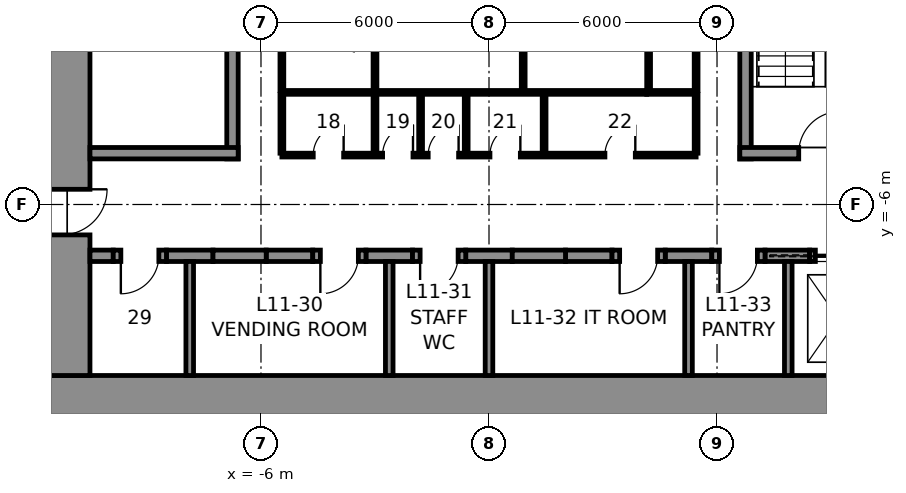
"""IFC4 building model, lengths in metres.
Left out: names, types, materials, properties, quantities, classifications, styles, units other than length and angle.
Written with IfcOpenShell. Run it as: python <this file> out.ifc"""

import sys

from ifc_helpers import new_model, si_unit, direction, frame, frame_2d, origin, place, context, subcontext, project, spatial, rectangle, extrude, element, fill, save


model = new_model("IFC4")
c1 = context("Model", 3, precision=1e-05, world=origin(), true_north=direction((0.0, 1.0)))
c2 = subcontext(c1, "Body", "Model", "MODEL_VIEW")
j1 = project(units=[si_unit("LENGTHUNIT", "METRE"), si_unit("PLANEANGLEUNIT", "RADIAN")], contexts=[c1])
p1 = place(None, origin())
s1 = spatial("IfcSite", under=j1, at=p1, CompositionType="ELEMENT")
p2 = place(p1, origin())
s2 = spatial("IfcBuilding", under=s1, at=p2, CompositionType="ELEMENT")
p3 = place(p2, frame((0.0, 0.0, 59.5)))
s3 = spatial("IfcBuildingStorey", under=s2, at=p3, CompositionType="ELEMENT", Elevation=59.5)
p4 = place(p3, frame((12.0, -11.25, 0.0), z_axis=(0.0, 0.0, 1.0), x_axis=(-1.0, 0.0, 0.0)))
e1 = element("IfcWall", 1, at=p4, inside=s3, PredefinedType="SHEAR", context=c2, shape_type="SweptSolid", body=[
    extrude(rectangle(XDim=24.0, YDim=1.5, at=frame_2d((12.0, 0.0))), origin(), (0.0, 0.0, 1.0), 5.5),
])
p5 = place(p3, frame((-11.25, -10.5, 0.0), z_axis=(0.0, 0.0, 1.0), x_axis=(0.0, 1.0, 0.0)))
e2 = element("IfcWall", 2, at=p5, inside=s3, PredefinedType="SHEAR", context=c2, shape_type="SweptSolid", body=[
    extrude(rectangle(XDim=21.0, YDim=1.5, at=frame_2d((10.5, 0.0))), origin(), (0.0, 0.0, 1.0), 5.5),
])
p6 = place(p5, frame((16.1, 0.0, 0.0)))
e3 = element("IfcOpeningElement", 3, at=p6, cuts=e2, PredefinedType="OPENING", context=c2, shape_type="SweptSolid", body=[
    extrude(rectangle(XDim=1.2, YDim=2.3, at=frame_2d((0.6, 1.15))), frame((0.0, 0.76, 0.0), z_axis=(0.0, -1.0, 0.0), x_axis=(1.0, 0.0, 0.0)), (0.0, 0.0, 1.0), 1.52),
])
p7 = place(p5, frame((3.7, 0.0, 0.0)))
e4 = element("IfcOpeningElement", 4, at=p7, cuts=e2, PredefinedType="OPENING", context=c2, shape_type="SweptSolid", body=[
    extrude(rectangle(XDim=1.2, YDim=2.3, at=frame_2d((0.6, 1.15))), frame((0.0, 0.76, 0.0), z_axis=(0.0, -1.0, 0.0), x_axis=(1.0, 0.0, 0.0)), (0.0, 0.0, 1.0), 1.52),
])
p8 = place(p3, frame((-10.5, -7.35, 0.0), z_axis=(0.0, 0.0, 1.0), x_axis=(1.0, 0.0, 0.0)))
e5 = element("IfcWall", 5, at=p8, inside=s3, PredefinedType="SHEAR", context=c2, shape_type="SweptSolid", body=[
    extrude(rectangle(XDim=0.613, YDim=0.3, at=frame_2d((0.306, 0.0))), origin(), (0.0, 0.0, 1.0), 5.5),
])
for number, where, z_axis, x_axis in (
    (6, (-8.488, -7.35, 0.0), (0.0, 0.0, 1.0), (1.0, 0.0, 0.0)),
    (7, (-5.863, -7.35, 0.0), (0.0, 0.0, 1.0), (1.0, 0.0, 0.0)),
    (8, (-3.238, -7.35, 0.0), (0.0, 0.0, 1.0), (1.0, 0.0, 0.0)),
    (9, (-0.613, -7.35, 0.0), (0.0, 0.0, 1.0), (1.0, 0.0, 0.0)),
    (10, (2.012, -7.35, 0.0), (0.0, 0.0, 1.0), (1.0, 0.0, 0.0)),
    (11, (4.637, -7.35, 0.0), (0.0, 0.0, 1.0), (1.0, 0.0, 0.0)),
):
    element("IfcWall", number, at=place(p3, frame(where, z_axis=z_axis, x_axis=x_axis)), inside=s3, PredefinedType="SHEAR", context=c2, shape_type="SweptSolid", body=[
        extrude(rectangle(XDim=1.225, YDim=0.3, at=frame_2d((0.613, 0.0))), origin(), (0.0, 0.0, 1.0), 5.5),
    ])
p9 = place(p3, frame((7.262, -7.35, 0.0), z_axis=(0.0, 0.0, 1.0), x_axis=(1.0, 0.0, 0.0)))
e12 = element("IfcWall", 12, at=p9, inside=s3, PredefinedType="SHEAR", context=c2, shape_type="SweptSolid", body=[
    extrude(rectangle(XDim=1.175, YDim=0.3, at=frame_2d((0.587, 0.0))), origin(), (0.0, 0.0, 1.0), 5.5),
])
p10 = place(p3, frame((-9.887, -7.35, 0.0), z_axis=(0.0, 0.0, 1.0), x_axis=(1.0, 0.0, 0.0)))
e13 = element("IfcWall", 13, at=p10, inside=s3, PredefinedType="PARTITIONING", context=c2, shape_type="SweptSolid", body=[
    extrude(rectangle(XDim=1.4, YDim=0.3, at=frame_2d((0.7, 0.0))), origin(), (0.0, 0.0, 1.0), 5.5),
])
p11 = place(p10, frame((0.2, 0.0, 0.0)))
e14 = element("IfcOpeningElement", 14, at=p11, cuts=e13, PredefinedType="OPENING", context=c2, shape_type="SweptSolid", body=[
    extrude(rectangle(XDim=1.0, YDim=2.3, at=frame_2d((0.5, 1.15))), frame((0.0, 0.16, 0.0), z_axis=(0.0, -1.0, 0.0), x_axis=(1.0, 0.0, 0.0)), (0.0, 0.0, 1.0), 0.32),
])
p12 = place(p3, frame((-7.262, -7.35, 0.0), z_axis=(0.0, 0.0, 1.0), x_axis=(1.0, 0.0, 0.0)))
e15 = element("IfcWall", 15, at=p12, inside=s3, PredefinedType="PARTITIONING", context=c2, shape_type="SweptSolid", body=[
    extrude(rectangle(XDim=1.4, YDim=0.3, at=frame_2d((0.7, 0.0))), origin(), (0.0, 0.0, 1.0), 5.5),
])
p13 = place(p3, frame((-4.637, -7.35, 0.0), z_axis=(0.0, 0.0, 1.0), x_axis=(1.0, 0.0, 0.0)))
e16 = element("IfcWall", 16, at=p13, inside=s3, PredefinedType="PARTITIONING", context=c2, shape_type="SweptSolid", body=[
    extrude(rectangle(XDim=1.4, YDim=0.3, at=frame_2d((0.7, 0.0))), origin(), (0.0, 0.0, 1.0), 5.5),
])
p14 = place(p13, frame((0.2, 0.0, 0.0)))
e17 = element("IfcOpeningElement", 17, at=p14, cuts=e16, PredefinedType="OPENING", context=c2, shape_type="SweptSolid", body=[
    extrude(rectangle(XDim=1.0, YDim=2.3, at=frame_2d((0.5, 1.15))), frame((0.0, 0.16, 0.0), z_axis=(0.0, -1.0, 0.0), x_axis=(1.0, 0.0, 0.0)), (0.0, 0.0, 1.0), 0.32),
])
p15 = place(p3, frame((-2.012, -7.35, 0.0), z_axis=(0.0, 0.0, 1.0), x_axis=(1.0, 0.0, 0.0)))
e18 = element("IfcWall", 18, at=p15, inside=s3, PredefinedType="PARTITIONING", context=c2, shape_type="SweptSolid", body=[
    extrude(rectangle(XDim=1.4, YDim=0.3, at=frame_2d((0.7, 0.0))), origin(), (0.0, 0.0, 1.0), 5.5),
])
p16 = place(p15, frame((0.2, 0.0, 0.0)))
e19 = element("IfcOpeningElement", 19, at=p16, cuts=e18, PredefinedType="OPENING", context=c2, shape_type="SweptSolid", body=[
    extrude(rectangle(XDim=1.0, YDim=2.3, at=frame_2d((0.5, 1.15))), frame((0.0, 0.16, 0.0), z_axis=(0.0, -1.0, 0.0), x_axis=(1.0, 0.0, 0.0)), (0.0, 0.0, 1.0), 0.32),
])
p17 = place(p3, frame((0.613, -7.35, 0.0), z_axis=(0.0, 0.0, 1.0), x_axis=(1.0, 0.0, 0.0)))
e20 = element("IfcWall", 20, at=p17, inside=s3, PredefinedType="PARTITIONING", context=c2, shape_type="SweptSolid", body=[
    extrude(rectangle(XDim=1.4, YDim=0.3, at=frame_2d((0.7, 0.0))), origin(), (0.0, 0.0, 1.0), 5.5),
])
p18 = place(p3, frame((3.238, -7.35, 0.0), z_axis=(0.0, 0.0, 1.0), x_axis=(1.0, 0.0, 0.0)))
e21 = element("IfcWall", 21, at=p18, inside=s3, PredefinedType="PARTITIONING", context=c2, shape_type="SweptSolid", body=[
    extrude(rectangle(XDim=1.4, YDim=0.3, at=frame_2d((0.7, 0.0))), origin(), (0.0, 0.0, 1.0), 5.5),
])
p19 = place(p18, frame((0.2, 0.0, 0.0)))
e22 = element("IfcOpeningElement", 22, at=p19, cuts=e21, PredefinedType="OPENING", context=c2, shape_type="SweptSolid", body=[
    extrude(rectangle(XDim=1.0, YDim=2.3, at=frame_2d((0.5, 1.15))), frame((0.0, 0.16, 0.0), z_axis=(0.0, -1.0, 0.0), x_axis=(1.0, 0.0, 0.0)), (0.0, 0.0, 1.0), 0.32),
])
p20 = place(p3, frame((5.863, -7.35, 0.0), z_axis=(0.0, 0.0, 1.0), x_axis=(1.0, 0.0, 0.0)))
e23 = element("IfcWall", 23, at=p20, inside=s3, PredefinedType="PARTITIONING", context=c2, shape_type="SweptSolid", body=[
    extrude(rectangle(XDim=1.4, YDim=0.3, at=frame_2d((0.7, 0.0))), origin(), (0.0, 0.0, 1.0), 5.5),
])
p21 = place(p20, frame((0.2, 0.0, 0.0)))
e24 = element("IfcOpeningElement", 24, at=p21, cuts=e23, PredefinedType="OPENING", context=c2, shape_type="SweptSolid", body=[
    extrude(rectangle(XDim=1.0, YDim=2.3, at=frame_2d((0.5, 1.15))), frame((0.0, 0.16, 0.0), z_axis=(0.0, -1.0, 0.0), x_axis=(1.0, 0.0, 0.0)), (0.0, 0.0, 1.0), 0.32),
])
p22 = place(p3, frame((8.438, -7.35, 0.0), z_axis=(0.0, 0.0, 1.0), x_axis=(1.0, 0.0, 0.0)))
e25 = element("IfcWall", 25, at=p22, inside=s3, PredefinedType="PARTITIONING", context=c2, shape_type="SweptSolid", body=[
    extrude(rectangle(XDim=1.5, YDim=0.3, at=frame_2d((0.75, 0.0))), origin(), (0.0, 0.0, 1.0), 5.5),
])
p23 = place(p22, frame((0.15, 0.0, 0.0)))
e26 = element("IfcOpeningElement", 26, at=p23, cuts=e25, PredefinedType="OPENING", context=c2, shape_type="SweptSolid", body=[
    extrude(rectangle(XDim=1.2, YDim=2.3, at=frame_2d((0.6, 1.15))), frame((0.0, 0.16, 0.0), z_axis=(0.0, -1.0, 0.0), x_axis=(1.0, 0.0, 0.0)), (0.0, 0.0, 1.0), 0.32),
])
for number, where, z_axis, x_axis in (
    (27, (-7.875, -10.5, 0.0), (0.0, 0.0, 1.0), (0.0, 1.0, 0.0)),
    (28, (-2.625, -10.5, 0.0), (0.0, 0.0, 1.0), (0.0, 1.0, 0.0)),
    (29, (0.0, -10.5, 0.0), (0.0, 0.0, 1.0), (0.0, 1.0, 0.0)),
    (30, (5.25, -10.5, 0.0), (0.0, 0.0, 1.0), (0.0, 1.0, 0.0)),
    (31, (7.875, -10.5, 0.0), (0.0, 0.0, 1.0), (0.0, 1.0, 0.0)),
):
    element("IfcWall", number, at=place(p3, frame(where, z_axis=z_axis, x_axis=x_axis)), inside=s3, PredefinedType="PARTITIONING", context=c2, shape_type="SweptSolid", body=[
        extrude(rectangle(XDim=3.0, YDim=0.2, at=frame_2d((1.5, 0.0))), origin(), (0.0, 0.0, 1.0), 5.5),
    ])
p24 = place(p3, frame((-6.75, -4.8, 0.0), z_axis=(0.0, 0.0, 1.0), x_axis=(0.0, 1.0, 0.0)))
e32 = element("IfcWall", 32, at=p24, inside=s3, PredefinedType="SOLIDWALL", context=c2, shape_type="SweptSolid", body=[
    extrude(rectangle(XDim=9.6, YDim=0.3, at=frame_2d((4.8, 0.0))), origin(), (0.0, 0.0, 1.0), 5.25),
])
p25 = place(p3, frame((-6.6, -4.65, 0.0), z_axis=(0.0, 0.0, 1.0), x_axis=(-1.0, 0.0, 0.0)))
e33 = element("IfcWall", 33, at=p25, inside=s3, PredefinedType="SOLIDWALL", context=c2, shape_type="SweptSolid", body=[
    extrude(rectangle(XDim=3.9, YDim=0.3, at=frame_2d((1.95, 0.0))), origin(), (0.0, 0.0, 1.0), 5.25),
])
p26 = place(p3, frame((6.75, -4.8, 0.0), z_axis=(0.0, 0.0, 1.0), x_axis=(0.0, 1.0, 0.0)))
e34 = element("IfcWall", 34, at=p26, inside=s3, PredefinedType="SOLIDWALL", context=c2, shape_type="SweptSolid", body=[
    extrude(rectangle(XDim=9.6, YDim=0.3, at=frame_2d((4.8, 0.0))), origin(), (0.0, 0.0, 1.0), 5.25),
])
p27 = place(p3, frame((10.5, -4.65, 0.0), z_axis=(0.0, 0.0, 1.0), x_axis=(-1.0, 0.0, 0.0)))
e35 = element("IfcWall", 35, at=p27, inside=s3, PredefinedType="SOLIDWALL", context=c2, shape_type="SweptSolid", body=[
    extrude(rectangle(XDim=3.9, YDim=0.3, at=frame_2d((1.95, 0.0))), origin(), (0.0, 0.0, 1.0), 5.25),
])
p28 = place(p27, frame((1.25, 0.0, 0.0)))
e36 = element("IfcOpeningElement", 36, at=p28, cuts=e35, PredefinedType="OPENING", context=c2, shape_type="SweptSolid", body=[
    extrude(rectangle(XDim=1.1, YDim=2.3, at=frame_2d((0.55, 1.15))), frame((0.0, 0.16, 0.0), z_axis=(0.0, -1.0, 0.0), x_axis=(1.0, 0.0, 0.0)), (0.0, 0.0, 1.0), 0.32),
])
p29 = place(p3, frame((4.15, -3.05, 0.0), z_axis=(0.0, 0.0, 1.0), x_axis=(-1.0, 0.0, 0.0)))
e37 = element("IfcWall", 37, at=p29, inside=s3, PredefinedType="PARTITIONING", context=c2, shape_type="SweptSolid", body=[
    extrude(rectangle(XDim=9.6, YDim=0.1, at=frame_2d((4.8, 0.0))), origin(), (0.0, 0.0, 1.0), 5.25),
])
p30 = place(p3, frame((5.45, -3.05, 0.0), z_axis=(0.0, 0.0, 1.0), x_axis=(-1.0, 0.0, 0.0)))
e38 = element("IfcWall", 38, at=p30, inside=s3, PredefinedType="PARTITIONING", context=c2, shape_type="SweptSolid", body=[
    extrude(rectangle(XDim=1.3, YDim=0.1, at=frame_2d((0.65, 0.0))), origin(), (0.0, 0.0, 1.0), 5.25),
])
for number, where, z_axis, x_axis in (
    (39, (5.45, 3.0, 0.0), (0.0, 0.0, 1.0), (0.0, -1.0, 0.0)),
    (40, (-5.45, -3.0, 0.0), (0.0, 0.0, 1.0), (0.0, 1.0, 0.0)),
    (41, (-3.0, -3.0, 0.0), (0.0, 0.0, 1.0), (0.0, 1.0, 0.0)),
    (42, (0.9, -3.0, 0.0), (0.0, 0.0, 1.0), (0.0, 1.0, 0.0)),
    (43, (4.2, -3.0, 0.0), (0.0, 0.0, 1.0), (0.0, 1.0, 0.0)),
):
    element("IfcWall", number, at=place(p3, frame(where, z_axis=z_axis, x_axis=x_axis)), inside=s3, PredefinedType="PARTITIONING", context=c2, shape_type="SweptSolid", body=[
        extrude(rectangle(XDim=6.0, YDim=0.1, at=frame_2d((3.0, 0.0))), origin(), (0.0, 0.0, 1.0), 5.25),
    ])
p31 = place(p3, frame((5.45, -4.7, 0.0), z_axis=(0.0, 0.0, 1.0), x_axis=(-1.0, 0.0, 0.0)))
e44 = element("IfcWall", 44, at=p31, inside=s3, PredefinedType="PARTITIONING", context=c2, shape_type="SweptSolid", body=[
    extrude(rectangle(XDim=10.9, YDim=0.1, at=frame_2d((5.45, 0.0))), origin(), (0.0, 0.0, 1.0), 5.25),
])
p32 = place(p31, frame((9.275, 0.0, 0.0)))
e45 = element("IfcOpeningElement", 45, at=p32, cuts=e44, PredefinedType="OPENING", context=c2, shape_type="SweptSolid", body=[
    extrude(rectangle(XDim=0.8, YDim=2.3, at=frame_2d((0.4, 1.15))), frame((0.0, 0.06, 0.0), z_axis=(0.0, -1.0, 0.0), x_axis=(1.0, 0.0, 0.0)), (0.0, 0.0, 1.0), 0.12),
])
p33 = place(p31, frame((7.45, 0.0, 0.0)))
e46 = element("IfcOpeningElement", 46, at=p33, cuts=e44, PredefinedType="OPENING", context=c2, shape_type="SweptSolid", body=[
    extrude(rectangle(XDim=0.8, YDim=2.3, at=frame_2d((0.4, 1.15))), frame((0.0, 0.06, 0.0), z_axis=(0.0, -1.0, 0.0), x_axis=(1.0, 0.0, 0.0)), (0.0, 0.0, 1.0), 0.12),
])
p34 = place(p31, frame((6.25, 0.0, 0.0)))
e47 = element("IfcOpeningElement", 47, at=p34, cuts=e44, PredefinedType="OPENING", context=c2, shape_type="SweptSolid", body=[
    extrude(rectangle(XDim=0.8, YDim=2.3, at=frame_2d((0.4, 1.15))), frame((0.0, 0.06, 0.0), z_axis=(0.0, -1.0, 0.0), x_axis=(1.0, 0.0, 0.0)), (0.0, 0.0, 1.0), 0.12),
])
p35 = place(p31, frame((4.625, 0.0, 0.0)))
e48 = element("IfcOpeningElement", 48, at=p35, cuts=e44, PredefinedType="OPENING", context=c2, shape_type="SweptSolid", body=[
    extrude(rectangle(XDim=0.8, YDim=2.3, at=frame_2d((0.4, 1.15))), frame((0.0, 0.06, 0.0), z_axis=(0.0, -1.0, 0.0), x_axis=(1.0, 0.0, 0.0)), (0.0, 0.0, 1.0), 0.12),
])
p36 = place(p31, frame((1.6, 0.0, 0.0)))
e49 = element("IfcOpeningElement", 49, at=p36, cuts=e44, PredefinedType="OPENING", context=c2, shape_type="SweptSolid", body=[
    extrude(rectangle(XDim=0.8, YDim=2.3, at=frame_2d((0.4, 1.15))), frame((0.0, 0.06, 0.0), z_axis=(0.0, -1.0, 0.0), x_axis=(1.0, 0.0, 0.0)), (0.0, 0.0, 1.0), 0.12),
])
for number, where, z_axis, x_axis in (
    (50, (-5.45, -3.1, 0.0), (0.0, 0.0, 1.0), (0.0, -1.0, 0.0)),
    (51, (5.45, -3.1, 0.0), (0.0, 0.0, 1.0), (0.0, -1.0, 0.0)),
    (52, (-3.0, -3.1, 0.0), (0.0, 0.0, 1.0), (0.0, -1.0, 0.0)),
    (53, (-1.8, -3.1, 0.0), (0.0, 0.0, 1.0), (0.0, -1.0, 0.0)),
    (54, (-0.6, -3.1, 0.0), (0.0, 0.0, 1.0), (0.0, -1.0, 0.0)),
    (55, (1.45, -3.1, 0.0), (0.0, 0.0, 1.0), (0.0, -1.0, 0.0)),
):
    element("IfcWall", number, at=place(p3, frame(where, z_axis=z_axis, x_axis=x_axis)), inside=s3, PredefinedType="PARTITIONING", context=c2, shape_type="SweptSolid", body=[
        extrude(rectangle(XDim=1.55, YDim=0.1, at=frame_2d((0.775, 0.0))), origin(), (0.0, 0.0, 1.0), 5.25),
    ])
p37 = place(p28, frame((1.1, 0.0, 0.0), z_axis=(0.0, 0.0, 1.0), x_axis=(-1.0, 0.0, 0.0)))
e56 = element("IfcDoor", 56, at=p37, inside=s3, OperationType="SINGLE_SWING_RIGHT", PredefinedType="DOOR", context=c2, shape_type="SweptSolid", body=[
    extrude(rectangle(XDim=1.1, YDim=2.3, at=frame_2d((0.55, 1.15))), frame((0.0, 0.025, 0.0), z_axis=(0.0, -1.0, 0.0), x_axis=(1.0, 0.0, 0.0)), (0.0, 0.0, 1.0), 0.05),
])
fill(e36, e56)
p38 = place(p32, frame((0.8, 0.0, 0.0), z_axis=(0.0, 0.0, 1.0), x_axis=(-1.0, 0.0, 0.0)))
e57 = element("IfcDoor", 57, at=p38, inside=s3, OperationType="SINGLE_SWING_RIGHT", PredefinedType="DOOR", context=c2, shape_type="SweptSolid", body=[
    extrude(rectangle(XDim=0.8, YDim=2.3, at=frame_2d((0.4, 1.15))), frame((0.0, 0.025, 0.0), z_axis=(0.0, -1.0, 0.0), x_axis=(1.0, 0.0, 0.0)), (0.0, 0.0, 1.0), 0.05),
])
fill(e45, e57)
p39 = place(p33, frame((0.8, 0.0, 0.0), z_axis=(0.0, 0.0, 1.0), x_axis=(-1.0, 0.0, 0.0)))
e58 = element("IfcDoor", 58, at=p39, inside=s3, OperationType="SINGLE_SWING_RIGHT", PredefinedType="DOOR", context=c2, shape_type="SweptSolid", body=[
    extrude(rectangle(XDim=0.8, YDim=2.3, at=frame_2d((0.4, 1.15))), frame((0.0, 0.025, 0.0), z_axis=(0.0, -1.0, 0.0), x_axis=(1.0, 0.0, 0.0)), (0.0, 0.0, 1.0), 0.05),
])
fill(e46, e58)
p40 = place(p34, frame((0.8, 0.0, 0.0), z_axis=(0.0, 0.0, 1.0), x_axis=(-1.0, 0.0, 0.0)))
e59 = element("IfcDoor", 59, at=p40, inside=s3, OperationType="SINGLE_SWING_RIGHT", PredefinedType="DOOR", context=c2, shape_type="SweptSolid", body=[
    extrude(rectangle(XDim=0.8, YDim=2.3, at=frame_2d((0.4, 1.15))), frame((0.0, 0.025, 0.0), z_axis=(0.0, -1.0, 0.0), x_axis=(1.0, 0.0, 0.0)), (0.0, 0.0, 1.0), 0.05),
])
fill(e47, e59)
p41 = place(p35, frame((0.8, 0.0, 0.0), z_axis=(0.0, 0.0, 1.0), x_axis=(-1.0, 0.0, 0.0)))
e60 = element("IfcDoor", 60, at=p41, inside=s3, OperationType="SINGLE_SWING_RIGHT", PredefinedType="DOOR", context=c2, shape_type="SweptSolid", body=[
    extrude(rectangle(XDim=0.8, YDim=2.3, at=frame_2d((0.4, 1.15))), frame((0.0, 0.025, 0.0), z_axis=(0.0, -1.0, 0.0), x_axis=(1.0, 0.0, 0.0)), (0.0, 0.0, 1.0), 0.05),
])
fill(e48, e60)
p42 = place(p36, frame((0.8, 0.0, 0.0), z_axis=(0.0, 0.0, 1.0), x_axis=(-1.0, 0.0, 0.0)))
e61 = element("IfcDoor", 61, at=p42, inside=s3, OperationType="SINGLE_SWING_RIGHT", PredefinedType="DOOR", context=c2, shape_type="SweptSolid", body=[
    extrude(rectangle(XDim=0.8, YDim=2.3, at=frame_2d((0.4, 1.15))), frame((0.0, 0.025, 0.0), z_axis=(0.0, -1.0, 0.0), x_axis=(1.0, 0.0, 0.0)), (0.0, 0.0, 1.0), 0.05),
])
fill(e49, e61)
p43 = place(p11, frame((1.0, 0.0, 0.0), z_axis=(0.0, 0.0, 1.0), x_axis=(-1.0, 0.0, 0.0)))
e62 = element("IfcDoor", 62, at=p43, inside=s3, OperationType="SINGLE_SWING_RIGHT", PredefinedType="DOOR", context=c2, shape_type="SweptSolid", body=[
    extrude(rectangle(XDim=1.0, YDim=2.3, at=frame_2d((0.5, 1.15))), frame((0.0, 0.025, 0.0), z_axis=(0.0, -1.0, 0.0), x_axis=(1.0, 0.0, 0.0)), (0.0, 0.0, 1.0), 0.05),
])
fill(e14, e62)
p44 = place(p14, frame((1.0, 0.0, 0.0), z_axis=(0.0, 0.0, 1.0), x_axis=(-1.0, 0.0, 0.0)))
e63 = element("IfcDoor", 63, at=p44, inside=s3, OperationType="SINGLE_SWING_RIGHT", PredefinedType="DOOR", context=c2, shape_type="SweptSolid", body=[
    extrude(rectangle(XDim=1.0, YDim=2.3, at=frame_2d((0.5, 1.15))), frame((0.0, 0.025, 0.0), z_axis=(0.0, -1.0, 0.0), x_axis=(1.0, 0.0, 0.0)), (0.0, 0.0, 1.0), 0.05),
])
fill(e17, e63)
p45 = place(p16, frame((1.0, 0.0, 0.0), z_axis=(0.0, 0.0, 1.0), x_axis=(-1.0, 0.0, 0.0)))
e64 = element("IfcDoor", 64, at=p45, inside=s3, OperationType="SINGLE_SWING_RIGHT", PredefinedType="DOOR", context=c2, shape_type="SweptSolid", body=[
    extrude(rectangle(XDim=1.0, YDim=2.3, at=frame_2d((0.5, 1.15))), frame((0.0, 0.025, 0.0), z_axis=(0.0, -1.0, 0.0), x_axis=(1.0, 0.0, 0.0)), (0.0, 0.0, 1.0), 0.05),
])
fill(e19, e64)
p46 = place(p19, frame((1.0, 0.0, 0.0), z_axis=(0.0, 0.0, 1.0), x_axis=(-1.0, 0.0, 0.0)))
e65 = element("IfcDoor", 65, at=p46, inside=s3, OperationType="SINGLE_SWING_RIGHT", PredefinedType="DOOR", context=c2, shape_type="SweptSolid", body=[
    extrude(rectangle(XDim=1.0, YDim=2.3, at=frame_2d((0.5, 1.15))), frame((0.0, 0.025, 0.0), z_axis=(0.0, -1.0, 0.0), x_axis=(1.0, 0.0, 0.0)), (0.0, 0.0, 1.0), 0.05),
])
fill(e22, e65)
p47 = place(p21, frame((1.0, 0.0, 0.0), z_axis=(0.0, 0.0, 1.0), x_axis=(-1.0, 0.0, 0.0)))
e66 = element("IfcDoor", 66, at=p47, inside=s3, OperationType="SINGLE_SWING_RIGHT", PredefinedType="DOOR", context=c2, shape_type="SweptSolid", body=[
    extrude(rectangle(XDim=1.0, YDim=2.3, at=frame_2d((0.5, 1.15))), frame((0.0, 0.025, 0.0), z_axis=(0.0, -1.0, 0.0), x_axis=(1.0, 0.0, 0.0)), (0.0, 0.0, 1.0), 0.05),
])
fill(e24, e66)
p48 = place(p7, frame((1.2, 0.0, 0.0), z_axis=(0.0, 0.0, 1.0), x_axis=(-1.0, 0.0, 0.0)))
e67 = element("IfcDoor", 67, at=p48, inside=s3, OperationType="SINGLE_SWING_LEFT", PredefinedType="DOOR", context=c2, shape_type="SweptSolid", body=[
    extrude(rectangle(XDim=1.2, YDim=2.3, at=frame_2d((0.6, 1.15))), frame((0.0, 0.025, 0.0), z_axis=(0.0, -1.0, 0.0), x_axis=(1.0, 0.0, 0.0)), (0.0, 0.0, 1.0), 0.05),
])
fill(e4, e67)
p49 = place(p23, origin())
e68 = element("IfcDoor", 68, at=p49, inside=s3, OperationType="SLIDING_TO_LEFT", PredefinedType="DOOR", context=c2, shape_type="SweptSolid", body=[
    extrude(rectangle(XDim=1.2, YDim=2.3, at=frame_2d((0.6, 1.15))), frame((0.0, 0.025, 0.0), z_axis=(0.0, -1.0, 0.0), x_axis=(1.0, 0.0, 0.0)), (0.0, 0.0, 1.0), 0.05),
])
fill(e26, e68)
save(model, sys.argv[1])
